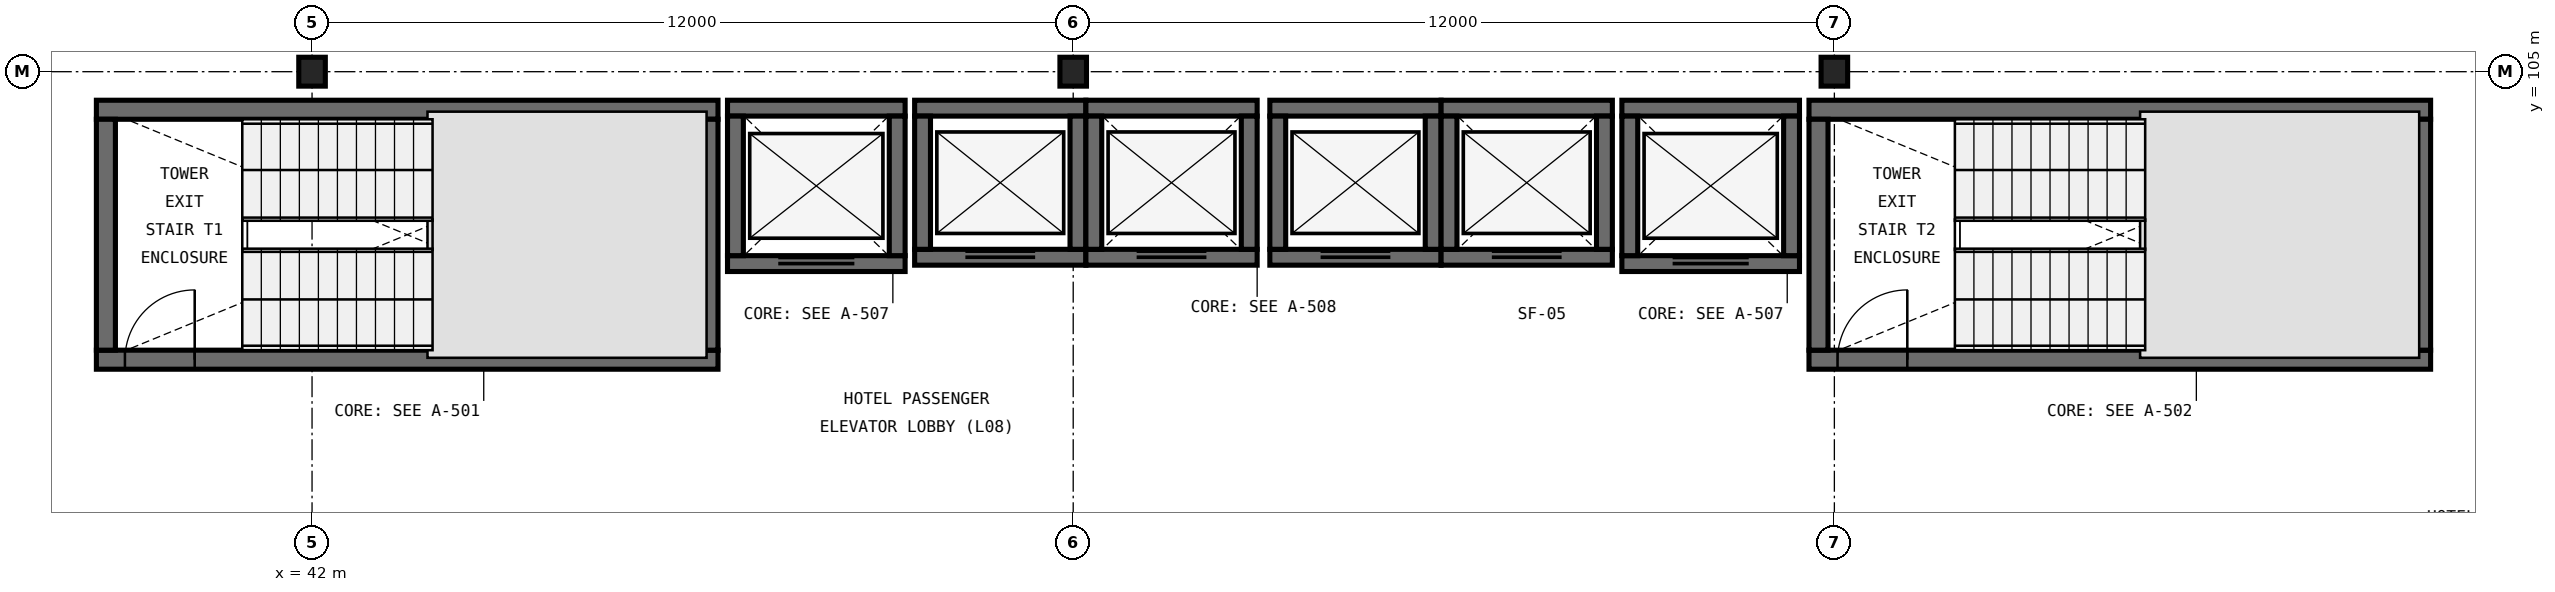
"""IFC4 building model, lengths in metres.
Left out: names, types, materials, properties, quantities, classifications, styles, units other than length and angle.
Written with IfcOpenShell. Run it as: python <this file> out.ifc"""

import sys

from ifc_helpers import new_model, si_unit, direction, frame, frame_2d, origin, origin_2d, place, context, subcontext, project, spatial, rectangle, i_section, extrude, element, fill, save


model = new_model("IFC4")
c1 = context("Model", 3, precision=1e-05, world=origin(), true_north=direction((0.0, 1.0)))
c2 = subcontext(c1, "Body", "Model", "MODEL_VIEW")
j1 = project(units=[si_unit("LENGTHUNIT", "METRE"), si_unit("PLANEANGLEUNIT", "RADIAN")], contexts=[c1])
p1 = place(None, origin())
s1 = spatial("IfcSite", under=j1, at=p1, CompositionType="ELEMENT")
p2 = place(p1, origin())
s2 = spatial("IfcBuilding", under=s1, at=p2, CompositionType="ELEMENT")
p3 = place(p2, frame((0.0, 0.0, 38.4)))
s3 = spatial("IfcBuildingStorey", under=s2, at=p3, CompositionType="ELEMENT", Elevation=38.4)
for number, where, z_axis, x_axis in (
    (1, (42.0, 105.0, 0.0), (0.0, 0.0, 1.0), (1.0, 0.0, 0.0)),
    (2, (54.0, 105.0, 0.0), (0.0, 0.0, 1.0), (1.0, 0.0, 0.0)),
    (3, (66.0, 105.0, 0.0), (0.0, 0.0, 1.0), (1.0, 0.0, 0.0)),
):
    element("IfcColumn", number, at=place(p3, frame(where, z_axis=z_axis, x_axis=x_axis)), inside=s3, PredefinedType="COLUMN", context=c2, shape_type="SweptSolid", body=[
        extrude(i_section(OverallWidth=0.419, OverallDepth=0.455, WebThickness=0.042, FlangeThickness=0.068, FilletRadius=0.031, at=origin_2d()), origin(), (0.0, 0.0, 1.0), 3.6),
    ])
p4 = place(p3, frame((38.6, 100.46, 0.0), z_axis=(0.0, 0.0, 1.0), x_axis=(1.0, 0.0, 0.0)))
e4 = element("IfcWall", 4, at=p4, inside=s3, PredefinedType="SHEAR", context=c2, shape_type="SweptSolid", body=[
    extrude(rectangle(XDim=9.8, YDim=0.3, at=frame_2d((4.9, 0.0))), origin(), (0.0, 0.0, 1.0), 3.6),
])
p5 = place(p4, frame((0.45, 0.0, 0.0)))
e5 = element("IfcOpeningElement", 5, at=p5, cuts=e4, PredefinedType="OPENING", context=c2, shape_type="SweptSolid", body=[
    extrude(rectangle(XDim=1.1, YDim=2.2, at=frame_2d((0.55, 1.1))), frame((0.0, 0.165, 0.0), z_axis=(0.0, -1.0, 0.0), x_axis=(1.0, 0.0, 0.0)), (0.0, 0.0, 1.0), 0.33),
])
p6 = place(p3, frame((48.4, 104.4, 0.0), z_axis=(0.0, 0.0, 1.0), x_axis=(-1.0, 0.0, 0.0)))
e6 = element("IfcWall", 6, at=p6, inside=s3, PredefinedType="SHEAR", context=c2, shape_type="SweptSolid", body=[
    extrude(rectangle(XDim=9.8, YDim=0.3, at=frame_2d((4.9, 0.0))), origin(), (0.0, 0.0, 1.0), 3.6),
])
for number, where, z_axis, x_axis in (
    (7, (38.75, 104.25, 0.0), (0.0, 0.0, 1.0), (0.0, -1.0, 0.0)),
    (8, (48.25, 100.61, 0.0), (0.0, 0.0, 1.0), (0.0, 1.0, 0.0)),
):
    element("IfcWall", number, at=place(p3, frame(where, z_axis=z_axis, x_axis=x_axis)), inside=s3, PredefinedType="SHEAR", context=c2, shape_type="SweptSolid", body=[
        extrude(rectangle(XDim=3.64, YDim=0.3, at=frame_2d((1.82, 0.0))), origin(), (0.0, 0.0, 1.0), 3.6),
    ])
p7 = place(p3, frame((65.6, 100.46, 0.0), z_axis=(0.0, 0.0, 1.0), x_axis=(1.0, 0.0, 0.0)))
e9 = element("IfcWall", 9, at=p7, inside=s3, PredefinedType="SHEAR", context=c2, shape_type="SweptSolid", body=[
    extrude(rectangle(XDim=9.8, YDim=0.3, at=frame_2d((4.9, 0.0))), origin(), (0.0, 0.0, 1.0), 3.6),
])
p8 = place(p7, frame((0.45, 0.0, 0.0)))
e10 = element("IfcOpeningElement", 10, at=p8, cuts=e9, PredefinedType="OPENING", context=c2, shape_type="SweptSolid", body=[
    extrude(rectangle(XDim=1.1, YDim=2.2, at=frame_2d((0.55, 1.1))), frame((0.0, 0.165, 0.0), z_axis=(0.0, -1.0, 0.0), x_axis=(1.0, 0.0, 0.0)), (0.0, 0.0, 1.0), 0.33),
])
p9 = place(p3, frame((75.4, 104.4, 0.0), z_axis=(0.0, 0.0, 1.0), x_axis=(-1.0, 0.0, 0.0)))
e11 = element("IfcWall", 11, at=p9, inside=s3, PredefinedType="SHEAR", context=c2, shape_type="SweptSolid", body=[
    extrude(rectangle(XDim=9.8, YDim=0.3, at=frame_2d((4.9, 0.0))), origin(), (0.0, 0.0, 1.0), 3.6),
])
for number, where, z_axis, x_axis in (
    (12, (65.75, 104.25, 0.0), (0.0, 0.0, 1.0), (0.0, -1.0, 0.0)),
    (13, (75.25, 100.61, 0.0), (0.0, 0.0, 1.0), (0.0, 1.0, 0.0)),
):
    element("IfcWall", number, at=place(p3, frame(where, z_axis=z_axis, x_axis=x_axis)), inside=s3, PredefinedType="SHEAR", context=c2, shape_type="SweptSolid", body=[
        extrude(rectangle(XDim=3.64, YDim=0.3, at=frame_2d((1.82, 0.0))), origin(), (0.0, 0.0, 1.0), 3.6),
    ])
p10 = place(p3, frame((48.55, 101.975, 0.0), z_axis=(0.0, 0.0, 1.0), x_axis=(1.0, 0.0, 0.0)))
e14 = element("IfcWall", 14, at=p10, inside=s3, PredefinedType="SHEAR", context=c2, shape_type="SweptSolid", body=[
    extrude(rectangle(XDim=2.8, YDim=0.25, at=frame_2d((1.4, 0.0))), origin(), (0.0, 0.0, 1.0), 3.6),
])
p11 = place(p10, frame((0.8, 0.0, 0.0)))
e15 = element("IfcOpeningElement", 15, at=p11, cuts=e14, PredefinedType="OPENING", context=c2, shape_type="SweptSolid", body=[
    extrude(rectangle(XDim=1.2, YDim=2.2, at=frame_2d((0.6, 1.1))), frame((0.0, 0.14, 0.0), z_axis=(0.0, -1.0, 0.0), x_axis=(1.0, 0.0, 0.0)), (0.0, 0.0, 1.0), 0.28),
])
p12 = place(p3, frame((51.35, 104.425, 0.0), z_axis=(0.0, 0.0, 1.0), x_axis=(-1.0, 0.0, 0.0)))
e16 = element("IfcWall", 16, at=p12, inside=s3, PredefinedType="SHEAR", context=c2, shape_type="SweptSolid", body=[
    extrude(rectangle(XDim=2.8, YDim=0.25, at=frame_2d((1.4, 0.0))), origin(), (0.0, 0.0, 1.0), 3.6),
])
for number, where, z_axis, x_axis in (
    (17, (48.675, 104.3, 0.0), (0.0, 0.0, 1.0), (0.0, -1.0, 0.0)),
    (18, (51.225, 102.1, 0.0), (0.0, 0.0, 1.0), (0.0, 1.0, 0.0)),
):
    element("IfcWall", number, at=place(p3, frame(where, z_axis=z_axis, x_axis=x_axis)), inside=s3, PredefinedType="SHEAR", context=c2, shape_type="SweptSolid", body=[
        extrude(rectangle(XDim=2.2, YDim=0.25, at=frame_2d((1.1, 0.0))), origin(), (0.0, 0.0, 1.0), 3.6),
    ])
p13 = place(p3, frame((62.65, 101.975, 0.0), z_axis=(0.0, 0.0, 1.0), x_axis=(1.0, 0.0, 0.0)))
e19 = element("IfcWall", 19, at=p13, inside=s3, PredefinedType="SHEAR", context=c2, shape_type="SweptSolid", body=[
    extrude(rectangle(XDim=2.8, YDim=0.25, at=frame_2d((1.4, 0.0))), origin(), (0.0, 0.0, 1.0), 3.6),
])
p14 = place(p13, frame((0.8, 0.0, 0.0)))
e20 = element("IfcOpeningElement", 20, at=p14, cuts=e19, PredefinedType="OPENING", context=c2, shape_type="SweptSolid", body=[
    extrude(rectangle(XDim=1.2, YDim=2.2, at=frame_2d((0.6, 1.1))), frame((0.0, 0.14, 0.0), z_axis=(0.0, -1.0, 0.0), x_axis=(1.0, 0.0, 0.0)), (0.0, 0.0, 1.0), 0.28),
])
p15 = place(p3, frame((65.45, 104.425, 0.0), z_axis=(0.0, 0.0, 1.0), x_axis=(-1.0, 0.0, 0.0)))
e21 = element("IfcWall", 21, at=p15, inside=s3, PredefinedType="SHEAR", context=c2, shape_type="SweptSolid", body=[
    extrude(rectangle(XDim=2.8, YDim=0.25, at=frame_2d((1.4, 0.0))), origin(), (0.0, 0.0, 1.0), 3.6),
])
for number, where, z_axis, x_axis in (
    (22, (62.775, 104.3, 0.0), (0.0, 0.0, 1.0), (0.0, -1.0, 0.0)),
    (23, (65.325, 102.1, 0.0), (0.0, 0.0, 1.0), (0.0, 1.0, 0.0)),
):
    element("IfcWall", number, at=place(p3, frame(where, z_axis=z_axis, x_axis=x_axis)), inside=s3, PredefinedType="SHEAR", context=c2, shape_type="SweptSolid", body=[
        extrude(rectangle(XDim=2.2, YDim=0.25, at=frame_2d((1.1, 0.0))), origin(), (0.0, 0.0, 1.0), 3.6),
    ])
p16 = place(p3, frame((51.5, 102.075, 0.0), z_axis=(0.0, 0.0, 1.0), x_axis=(1.0, 0.0, 0.0)))
e24 = element("IfcWall", 24, at=p16, inside=s3, PredefinedType="SHEAR", context=c2, shape_type="SweptSolid", body=[
    extrude(rectangle(XDim=2.7, YDim=0.25, at=frame_2d((1.35, 0.0))), origin(), (0.0, 0.0, 1.0), 3.6),
])
p17 = place(p16, frame((0.8, 0.0, 0.0)))
e25 = element("IfcOpeningElement", 25, at=p17, cuts=e24, PredefinedType="OPENING", context=c2, shape_type="SweptSolid", body=[
    extrude(rectangle(XDim=1.1, YDim=2.2, at=frame_2d((0.55, 1.1))), frame((0.0, 0.14, 0.0), z_axis=(0.0, -1.0, 0.0), x_axis=(1.0, 0.0, 0.0)), (0.0, 0.0, 1.0), 0.28),
])
p18 = place(p3, frame((54.2, 104.425, 0.0), z_axis=(0.0, 0.0, 1.0), x_axis=(-1.0, 0.0, 0.0)))
e26 = element("IfcWall", 26, at=p18, inside=s3, PredefinedType="SHEAR", context=c2, shape_type="SweptSolid", body=[
    extrude(rectangle(XDim=2.7, YDim=0.25, at=frame_2d((1.35, 0.0))), origin(), (0.0, 0.0, 1.0), 3.6),
])
for number, where, z_axis, x_axis in (
    (27, (51.625, 104.3, 0.0), (0.0, 0.0, 1.0), (0.0, -1.0, 0.0)),
    (28, (54.075, 102.2, 0.0), (0.0, 0.0, 1.0), (0.0, 1.0, 0.0)),
):
    element("IfcWall", number, at=place(p3, frame(where, z_axis=z_axis, x_axis=x_axis)), inside=s3, PredefinedType="SHEAR", context=c2, shape_type="SweptSolid", body=[
        extrude(rectangle(XDim=2.1, YDim=0.25, at=frame_2d((1.05, 0.0))), origin(), (0.0, 0.0, 1.0), 3.6),
    ])
p19 = place(p3, frame((54.2, 102.075, 0.0), z_axis=(0.0, 0.0, 1.0), x_axis=(1.0, 0.0, 0.0)))
e29 = element("IfcWall", 29, at=p19, inside=s3, PredefinedType="SHEAR", context=c2, shape_type="SweptSolid", body=[
    extrude(rectangle(XDim=2.7, YDim=0.25, at=frame_2d((1.35, 0.0))), origin(), (0.0, 0.0, 1.0), 3.6),
])
p20 = place(p19, frame((0.8, 0.0, 0.0)))
e30 = element("IfcOpeningElement", 30, at=p20, cuts=e29, PredefinedType="OPENING", context=c2, shape_type="SweptSolid", body=[
    extrude(rectangle(XDim=1.1, YDim=2.2, at=frame_2d((0.55, 1.1))), frame((0.0, 0.14, 0.0), z_axis=(0.0, -1.0, 0.0), x_axis=(1.0, 0.0, 0.0)), (0.0, 0.0, 1.0), 0.28),
])
p21 = place(p3, frame((56.9, 104.425, 0.0), z_axis=(0.0, 0.0, 1.0), x_axis=(-1.0, 0.0, 0.0)))
e31 = element("IfcWall", 31, at=p21, inside=s3, PredefinedType="SHEAR", context=c2, shape_type="SweptSolid", body=[
    extrude(rectangle(XDim=2.7, YDim=0.25, at=frame_2d((1.35, 0.0))), origin(), (0.0, 0.0, 1.0), 3.6),
])
for number, where, z_axis, x_axis in (
    (32, (54.325, 104.3, 0.0), (0.0, 0.0, 1.0), (0.0, -1.0, 0.0)),
    (33, (56.775, 102.2, 0.0), (0.0, 0.0, 1.0), (0.0, 1.0, 0.0)),
):
    element("IfcWall", number, at=place(p3, frame(where, z_axis=z_axis, x_axis=x_axis)), inside=s3, PredefinedType="SHEAR", context=c2, shape_type="SweptSolid", body=[
        extrude(rectangle(XDim=2.1, YDim=0.25, at=frame_2d((1.05, 0.0))), origin(), (0.0, 0.0, 1.0), 3.6),
    ])
p22 = place(p3, frame((57.1, 102.075, 0.0), z_axis=(0.0, 0.0, 1.0), x_axis=(1.0, 0.0, 0.0)))
e34 = element("IfcWall", 34, at=p22, inside=s3, PredefinedType="SHEAR", context=c2, shape_type="SweptSolid", body=[
    extrude(rectangle(XDim=2.7, YDim=0.25, at=frame_2d((1.35, 0.0))), origin(), (0.0, 0.0, 1.0), 3.6),
])
p23 = place(p22, frame((0.8, 0.0, 0.0)))
e35 = element("IfcOpeningElement", 35, at=p23, cuts=e34, PredefinedType="OPENING", context=c2, shape_type="SweptSolid", body=[
    extrude(rectangle(XDim=1.1, YDim=2.2, at=frame_2d((0.55, 1.1))), frame((0.0, 0.14, 0.0), z_axis=(0.0, -1.0, 0.0), x_axis=(1.0, 0.0, 0.0)), (0.0, 0.0, 1.0), 0.28),
])
p24 = place(p3, frame((59.8, 104.425, 0.0), z_axis=(0.0, 0.0, 1.0), x_axis=(-1.0, 0.0, 0.0)))
e36 = element("IfcWall", 36, at=p24, inside=s3, PredefinedType="SHEAR", context=c2, shape_type="SweptSolid", body=[
    extrude(rectangle(XDim=2.7, YDim=0.25, at=frame_2d((1.35, 0.0))), origin(), (0.0, 0.0, 1.0), 3.6),
])
for number, where, z_axis, x_axis in (
    (37, (57.225, 104.3, 0.0), (0.0, 0.0, 1.0), (0.0, -1.0, 0.0)),
    (38, (59.675, 102.2, 0.0), (0.0, 0.0, 1.0), (0.0, 1.0, 0.0)),
):
    element("IfcWall", number, at=place(p3, frame(where, z_axis=z_axis, x_axis=x_axis)), inside=s3, PredefinedType="SHEAR", context=c2, shape_type="SweptSolid", body=[
        extrude(rectangle(XDim=2.1, YDim=0.25, at=frame_2d((1.05, 0.0))), origin(), (0.0, 0.0, 1.0), 3.6),
    ])
p25 = place(p3, frame((59.8, 102.075, 0.0), z_axis=(0.0, 0.0, 1.0), x_axis=(1.0, 0.0, 0.0)))
e39 = element("IfcWall", 39, at=p25, inside=s3, PredefinedType="SHEAR", context=c2, shape_type="SweptSolid", body=[
    extrude(rectangle(XDim=2.7, YDim=0.25, at=frame_2d((1.35, 0.0))), origin(), (0.0, 0.0, 1.0), 3.6),
])
p26 = place(p25, frame((0.8, 0.0, 0.0)))
e40 = element("IfcOpeningElement", 40, at=p26, cuts=e39, PredefinedType="OPENING", context=c2, shape_type="SweptSolid", body=[
    extrude(rectangle(XDim=1.1, YDim=2.2, at=frame_2d((0.55, 1.1))), frame((0.0, 0.14, 0.0), z_axis=(0.0, -1.0, 0.0), x_axis=(1.0, 0.0, 0.0)), (0.0, 0.0, 1.0), 0.28),
])
p27 = place(p3, frame((62.5, 104.425, 0.0), z_axis=(0.0, 0.0, 1.0), x_axis=(-1.0, 0.0, 0.0)))
e41 = element("IfcWall", 41, at=p27, inside=s3, PredefinedType="SHEAR", context=c2, shape_type="SweptSolid", body=[
    extrude(rectangle(XDim=2.7, YDim=0.25, at=frame_2d((1.35, 0.0))), origin(), (0.0, 0.0, 1.0), 3.6),
])
for number, where, z_axis, x_axis in (
    (42, (59.925, 104.3, 0.0), (0.0, 0.0, 1.0), (0.0, -1.0, 0.0)),
    (43, (62.375, 102.2, 0.0), (0.0, 0.0, 1.0), (0.0, 1.0, 0.0)),
):
    element("IfcWall", number, at=place(p3, frame(where, z_axis=z_axis, x_axis=x_axis)), inside=s3, PredefinedType="SHEAR", context=c2, shape_type="SweptSolid", body=[
        extrude(rectangle(XDim=2.1, YDim=0.25, at=frame_2d((1.05, 0.0))), origin(), (0.0, 0.0, 1.0), 3.6),
    ])
p28 = place(p5, origin())
e44 = element("IfcDoor", 44, at=p28, inside=s3, OperationType="SINGLE_SWING_RIGHT", PredefinedType="DOOR", context=c2, shape_type="SweptSolid", body=[
    extrude(rectangle(XDim=1.1, YDim=2.2, at=frame_2d((0.55, 1.1))), frame((0.0, 0.025, 0.0), z_axis=(0.0, -1.0, 0.0), x_axis=(1.0, 0.0, 0.0)), (0.0, 0.0, 1.0), 0.05),
])
fill(e5, e44)
p29 = place(p8, origin())
e45 = element("IfcDoor", 45, at=p29, inside=s3, OperationType="SINGLE_SWING_RIGHT", PredefinedType="DOOR", context=c2, shape_type="SweptSolid", body=[
    extrude(rectangle(XDim=1.1, YDim=2.2, at=frame_2d((0.55, 1.1))), frame((0.0, 0.025, 0.0), z_axis=(0.0, -1.0, 0.0), x_axis=(1.0, 0.0, 0.0)), (0.0, 0.0, 1.0), 0.05),
])
fill(e10, e45)
p30 = place(p11, origin())
e46 = element("IfcDoor", 46, at=p30, inside=s3, OperationType="DOUBLE_DOOR_SLIDING", PredefinedType="DOOR", context=c2, shape_type="SweptSolid", body=[
    extrude(rectangle(XDim=1.2, YDim=2.2, at=frame_2d((0.6, 1.1))), frame((0.0, 0.025, 0.0), z_axis=(0.0, -1.0, 0.0), x_axis=(1.0, 0.0, 0.0)), (0.0, 0.0, 1.0), 0.05),
])
fill(e15, e46)
p31 = place(p14, origin())
e47 = element("IfcDoor", 47, at=p31, inside=s3, OperationType="DOUBLE_DOOR_SLIDING", PredefinedType="DOOR", context=c2, shape_type="SweptSolid", body=[
    extrude(rectangle(XDim=1.2, YDim=2.2, at=frame_2d((0.6, 1.1))), frame((0.0, 0.025, 0.0), z_axis=(0.0, -1.0, 0.0), x_axis=(1.0, 0.0, 0.0)), (0.0, 0.0, 1.0), 0.05),
])
fill(e20, e47)
p32 = place(p17, origin())
e48 = element("IfcDoor", 48, at=p32, inside=s3, OperationType="DOUBLE_DOOR_SLIDING", PredefinedType="DOOR", context=c2, shape_type="SweptSolid", body=[
    extrude(rectangle(XDim=1.1, YDim=2.2, at=frame_2d((0.55, 1.1))), frame((0.0, 0.025, 0.0), z_axis=(0.0, -1.0, 0.0), x_axis=(1.0, 0.0, 0.0)), (0.0, 0.0, 1.0), 0.05),
])
fill(e25, e48)
p33 = place(p20, origin())
e49 = element("IfcDoor", 49, at=p33, inside=s3, OperationType="DOUBLE_DOOR_SLIDING", PredefinedType="DOOR", context=c2, shape_type="SweptSolid", body=[
    extrude(rectangle(XDim=1.1, YDim=2.2, at=frame_2d((0.55, 1.1))), frame((0.0, 0.025, 0.0), z_axis=(0.0, -1.0, 0.0), x_axis=(1.0, 0.0, 0.0)), (0.0, 0.0, 1.0), 0.05),
])
fill(e30, e49)
p34 = place(p23, origin())
e50 = element("IfcDoor", 50, at=p34, inside=s3, OperationType="DOUBLE_DOOR_SLIDING", PredefinedType="DOOR", context=c2, shape_type="SweptSolid", body=[
    extrude(rectangle(XDim=1.1, YDim=2.2, at=frame_2d((0.55, 1.1))), frame((0.0, 0.025, 0.0), z_axis=(0.0, -1.0, 0.0), x_axis=(1.0, 0.0, 0.0)), (0.0, 0.0, 1.0), 0.05),
])
fill(e35, e50)
p35 = place(p26, origin())
e51 = element("IfcDoor", 51, at=p35, inside=s3, OperationType="DOUBLE_DOOR_SLIDING", PredefinedType="DOOR", context=c2, shape_type="SweptSolid", body=[
    extrude(rectangle(XDim=1.1, YDim=2.2, at=frame_2d((0.55, 1.1))), frame((0.0, 0.025, 0.0), z_axis=(0.0, -1.0, 0.0), x_axis=(1.0, 0.0, 0.0)), (0.0, 0.0, 1.0), 0.05),
])
fill(e40, e51)
save(model, sys.argv[1])
